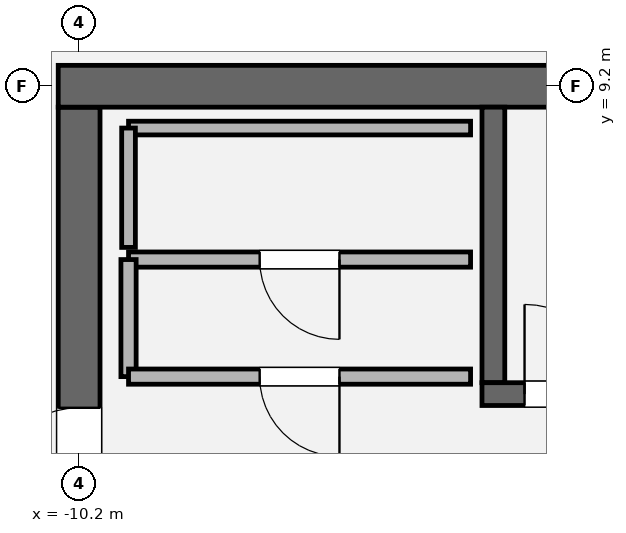
"""IFC4 building model, lengths in metres.
Left out: names, types, materials, properties, quantities, classifications, styles, units other than length and angle.
Written with IfcOpenShell. Run it as: python <this file> out.ifc"""

import sys

from ifc_helpers import new_model, si_unit, direction, frame, frame_2d, origin, place, context, subcontext, project, spatial, rectangle, extrude, element, fill, save


model = new_model("IFC4")
c1 = context("Model", 3, precision=1e-05, world=origin(), true_north=direction((0.0, 1.0)))
c2 = subcontext(c1, "Body", "Model", "MODEL_VIEW")
j1 = project(units=[si_unit("LENGTHUNIT", "METRE"), si_unit("PLANEANGLEUNIT", "RADIAN")], contexts=[c1])
p1 = place(None, origin())
s1 = spatial("IfcSite", under=j1, at=p1, CompositionType="ELEMENT")
p2 = place(p1, origin())
s2 = spatial("IfcBuilding", under=s1, at=p2, CompositionType="ELEMENT")
p3 = place(p2, frame((0.0, 0.0, 300.6)))
s3 = spatial("IfcBuildingStorey", under=s2, at=p3, CompositionType="ELEMENT", Elevation=300.6)
p4 = place(p3, frame((-10.2, -8.925, 0.0), z_axis=(0.0, 0.0, 1.0), x_axis=(0.0, 1.0, 0.0)))
e1 = element("IfcWall", 1, at=p4, inside=s3, PredefinedType="SHEAR", context=c2, shape_type="SweptSolid", body=[
    extrude(rectangle(XDim=17.85, YDim=0.55, at=frame_2d((8.925, 0.0))), origin(), (0.0, 0.0, 1.0), 4.2),
])
p5 = place(p4, frame((12.715, 0.0, 0.0)))
e2 = element("IfcOpeningElement", 2, at=p5, cuts=e1, PredefinedType="OPENING", context=c2, shape_type="SweptSolid", body=[
    extrude(rectangle(XDim=1.18, YDim=2.2, at=frame_2d((0.59, 1.1))), frame((0.0, 0.285, 0.0), z_axis=(0.0, -1.0, 0.0), x_axis=(1.0, 0.0, 0.0)), (0.0, 0.0, 1.0), 0.57),
])
p6 = place(p3, frame((-10.475, 9.2, 0.0), z_axis=(0.0, 0.0, 1.0), x_axis=(1.0, 0.0, 0.0)))
e3 = element("IfcWall", 3, at=p6, inside=s3, PredefinedType="SHEAR", context=c2, shape_type="SweptSolid", body=[
    extrude(rectangle(XDim=20.95, YDim=0.55, at=frame_2d((10.475, 0.0))), origin(), (0.0, 0.0, 1.0), 4.2),
])
p7 = place(p3, frame((-4.75, 5.3, 0.0), z_axis=(0.0, 0.0, 1.0), x_axis=(0.0, 1.0, 0.0)))
e4 = element("IfcWall", 4, at=p7, inside=s3, PredefinedType="SOLIDWALL", context=c2, shape_type="SweptSolid", body=[
    extrude(rectangle(XDim=3.625, YDim=0.3, at=frame_2d((1.812, 0.0))), origin(), (0.0, 0.0, 1.0), 4.2),
])
p8 = place(p3, frame((-4.9, 5.15, 0.0), z_axis=(0.0, 0.0, 1.0), x_axis=(1.0, 0.0, 0.0)))
e5 = element("IfcWall", 5, at=p8, inside=s3, PredefinedType="SOLIDWALL", context=c2, shape_type="SweptSolid", body=[
    extrude(rectangle(XDim=9.8, YDim=0.3, at=frame_2d((4.9, 0.0))), origin(), (0.0, 0.0, 1.0), 4.2),
])
p9 = place(p8, frame((0.56, 0.0, 0.0)))
e6 = element("IfcOpeningElement", 6, at=p9, cuts=e5, PredefinedType="OPENING", context=c2, shape_type="SweptSolid", body=[
    extrude(rectangle(XDim=1.18, YDim=2.2, at=frame_2d((0.59, 1.1))), frame((0.0, 0.16, 0.0), z_axis=(0.0, -1.0, 0.0), x_axis=(1.0, 0.0, 0.0)), (0.0, 0.0, 1.0), 0.32),
])
p10 = place(p3, frame((-5.05, 6.92, 0.0), z_axis=(0.0, 0.0, 1.0), x_axis=(-1.0, 0.0, 0.0)))
e7 = element("IfcWall", 7, at=p10, inside=s3, PredefinedType="SOLIDWALL", context=c2, shape_type="SweptSolid", body=[
    extrude(rectangle(XDim=4.5, YDim=0.2, at=frame_2d((2.25, 0.0))), origin(), (0.0, 0.0, 1.0), 4.0),
])
p11 = place(p10, frame((1.725, 0.0, 0.0)))
e8 = element("IfcOpeningElement", 8, at=p11, cuts=e7, PredefinedType="OPENING", context=c2, shape_type="SweptSolid", body=[
    extrude(rectangle(XDim=1.05, YDim=2.2, at=frame_2d((0.525, 1.1))), frame((0.0, 0.11, 0.0), z_axis=(0.0, -1.0, 0.0), x_axis=(1.0, 0.0, 0.0)), (0.0, 0.0, 1.0), 0.22),
])
p12 = place(p3, frame((-9.55, 6.92, 0.0), z_axis=(0.0, 0.0, 1.0), x_axis=(0.0, -1.0, 0.0)))
e9 = element("IfcWall", 9, at=p12, inside=s3, PredefinedType="SOLIDWALL", context=c2, shape_type="SweptSolid", body=[
    extrude(rectangle(XDim=1.54, YDim=0.2, at=frame_2d((0.77, 0.0))), origin(), (0.0, 0.0, 1.0), 4.0),
])
p13 = place(p3, frame((-9.55, 5.38, 0.0), z_axis=(0.0, 0.0, 1.0), x_axis=(1.0, 0.0, 0.0)))
e10 = element("IfcWall", 10, at=p13, inside=s3, PredefinedType="SOLIDWALL", context=c2, shape_type="SweptSolid", body=[
    extrude(rectangle(XDim=4.5, YDim=0.2, at=frame_2d((2.25, 0.0))), origin(), (0.0, 0.0, 1.0), 4.0),
])
p14 = place(p13, frame((1.725, 0.0, 0.0)))
e11 = element("IfcOpeningElement", 11, at=p14, cuts=e10, PredefinedType="OPENING", context=c2, shape_type="SweptSolid", body=[
    extrude(rectangle(XDim=1.05, YDim=2.2, at=frame_2d((0.525, 1.1))), frame((0.0, 0.11, 0.0), z_axis=(0.0, -1.0, 0.0), x_axis=(1.0, 0.0, 0.0)), (0.0, 0.0, 1.0), 0.22),
])
p15 = place(p3, frame((-5.05, 8.65, 0.0), z_axis=(0.0, 0.0, 1.0), x_axis=(-1.0, 0.0, 0.0)))
e12 = element("IfcWall", 12, at=p15, inside=s3, PredefinedType="PARTITIONING", context=c2, shape_type="SweptSolid", body=[
    extrude(rectangle(XDim=4.5, YDim=0.18, at=frame_2d((2.25, 0.0))), origin(), (0.0, 0.0, 1.0), 4.0),
])
p16 = place(p3, frame((-9.55, 8.65, 0.0), z_axis=(0.0, 0.0, 1.0), x_axis=(0.0, -1.0, 0.0)))
e13 = element("IfcWall", 13, at=p16, inside=s3, PredefinedType="PARTITIONING", context=c2, shape_type="SweptSolid", body=[
    extrude(rectangle(XDim=1.57, YDim=0.18, at=frame_2d((0.785, 0.0))), origin(), (0.0, 0.0, 1.0), 4.0),
])
p17 = place(p9, origin())
e14 = element("IfcDoor", 14, at=p17, inside=s3, OperationType="SINGLE_SWING_LEFT", PredefinedType="DOOR", context=c2, shape_type="SweptSolid", body=[
    extrude(rectangle(XDim=1.18, YDim=2.2, at=frame_2d((0.59, 1.1))), frame((0.0, 0.025, 0.0), z_axis=(0.0, -1.0, 0.0), x_axis=(1.0, 0.0, 0.0)), (0.0, 0.0, 1.0), 0.05),
])
fill(e6, e14)
p18 = place(p5, origin())
e15 = element("IfcDoor", 15, at=p18, inside=s3, OperationType="SINGLE_SWING_LEFT", PredefinedType="DOOR", context=c2, shape_type="SweptSolid", body=[
    extrude(rectangle(XDim=1.18, YDim=2.2, at=frame_2d((0.59, 1.1))), frame((0.0, 0.025, 0.0), z_axis=(0.0, -1.0, 0.0), x_axis=(1.0, 0.0, 0.0)), (0.0, 0.0, 1.0), 0.05),
])
fill(e2, e15)
p19 = place(p14, origin())
e16 = element("IfcDoor", 16, at=p19, inside=s3, OperationType="SINGLE_SWING_RIGHT", PredefinedType="DOOR", context=c2, shape_type="SweptSolid", body=[
    extrude(rectangle(XDim=1.05, YDim=2.2, at=frame_2d((0.525, 1.1))), frame((0.0, 0.025, 0.0), z_axis=(0.0, -1.0, 0.0), x_axis=(1.0, 0.0, 0.0)), (0.0, 0.0, 1.0), 0.05),
])
fill(e11, e16)
p20 = place(p11, origin())
e17 = element("IfcDoor", 17, at=p20, inside=s3, OperationType="SINGLE_SWING_LEFT", PredefinedType="DOOR", context=c2, shape_type="SweptSolid", body=[
    extrude(rectangle(XDim=1.05, YDim=2.2, at=frame_2d((0.525, 1.1))), frame((0.0, 0.025, 0.0), z_axis=(0.0, -1.0, 0.0), x_axis=(1.0, 0.0, 0.0)), (0.0, 0.0, 1.0), 0.05),
])
fill(e8, e17)
save(model, sys.argv[1])
